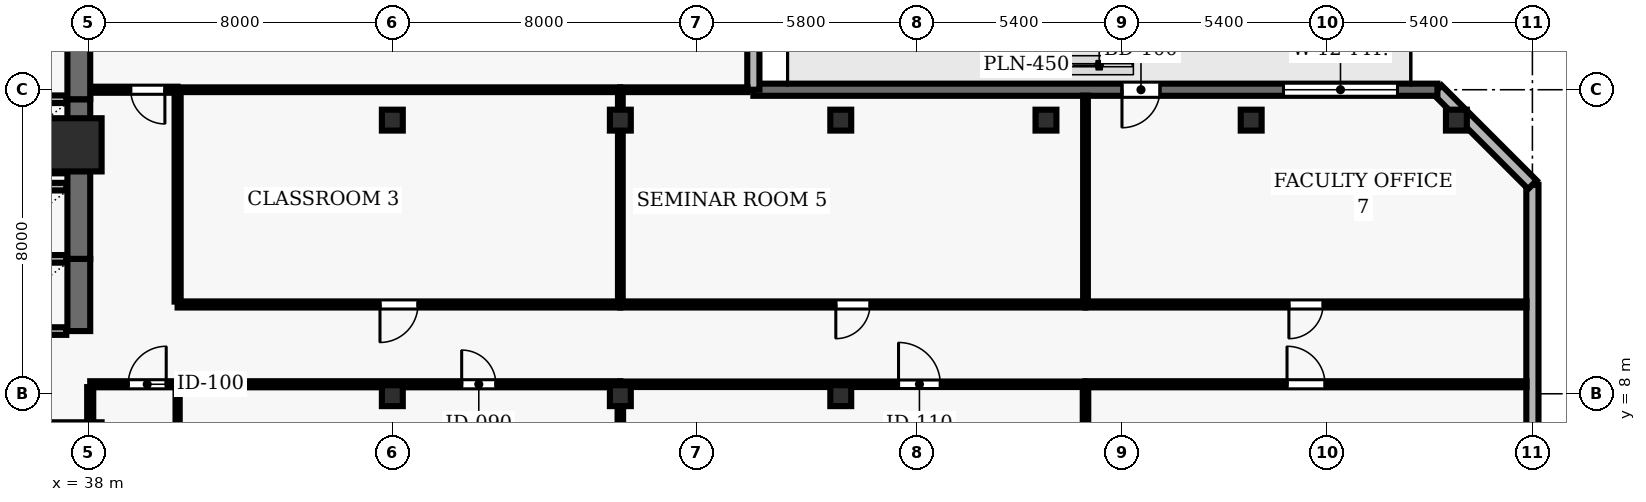
"""IFC4 building model, lengths in metres.
Left out: names, types, materials, properties, quantities, classifications, styles, units other than length and angle.
Written with IfcOpenShell. Run it as: python <this file> out.ifc"""

import sys

from ifc_helpers import new_model, si_unit, direction, frame, frame_2d, origin, origin_2d, place, context, subcontext, project, spatial, rectangle, hollow_rectangle, extrude, element, fill, save


model = new_model("IFC4")
c1 = context("Model", 3, precision=1e-05, world=origin(), true_north=direction((0.0, 1.0)))
c2 = subcontext(c1, "Body", "Model", "MODEL_VIEW")
j1 = project(units=[si_unit("LENGTHUNIT", "METRE"), si_unit("PLANEANGLEUNIT", "RADIAN")], contexts=[c1])
p1 = place(None, origin())
s1 = spatial("IfcSite", under=j1, at=p1, CompositionType="ELEMENT")
p2 = place(p1, origin())
s2 = spatial("IfcBuilding", under=s1, at=p2, CompositionType="ELEMENT")
p3 = place(p2, frame((0.0, 0.0, 34.9)))
s3 = spatial("IfcBuildingStorey", under=s2, at=p3, CompositionType="ELEMENT", Elevation=34.9)
p4 = place(p3, frame((37.65, 14.55, 0.0), z_axis=(0.0, 0.0, 1.0), x_axis=(1.0, 0.0, 0.0)))
e1 = element("IfcColumn", 1, at=p4, inside=s3, PredefinedType="COLUMN", context=c2, shape_type="SweptSolid", body=[
    extrude(rectangle(XDim=1.4, YDim=1.4, at=origin_2d()), origin(), (0.0, 0.0, 1.0), 3.9),
])
for number, where, z_axis, x_axis in (
    (2, (46.0, 7.95, 0.0), (0.0, 0.0, 1.0), (1.0, 0.0, 0.0)),
    (3, (46.0, 15.2, 0.0), (0.0, 0.0, 1.0), (1.0, 0.0, 0.0)),
    (4, (52.0, 7.95, 0.0), (0.0, 0.0, 1.0), (1.0, 0.0, 0.0)),
    (5, (52.0, 15.2, 0.0), (0.0, 0.0, 1.0), (1.0, 0.0, 0.0)),
    (6, (57.8, 7.95, 0.0), (0.0, 0.0, 1.0), (1.0, 0.0, 0.0)),
    (7, (57.8, 15.2, 0.0), (0.0, 0.0, 1.0), (1.0, 0.0, 0.0)),
    (8, (63.2, 15.2, 0.0), (0.0, 0.0, 1.0), (1.0, 0.0, 0.0)),
    (9, (68.6, 15.2, 0.0), (0.0, 0.0, 1.0), (1.0, 0.0, 0.0)),
    (10, (74.0, 15.2, 0.0), (0.0, 0.0, 1.0), (1.0, 0.0, 0.0)),
):
    element("IfcColumn", number, at=place(p3, frame(where, z_axis=z_axis, x_axis=x_axis)), inside=s3, PredefinedType="COLUMN", context=c2, shape_type="SweptSolid", body=[
        extrude(hollow_rectangle(XDim=0.55, YDim=0.55, WallThickness=0.025, at=origin_2d()), origin(), (0.0, 0.0, 1.0), 3.9),
    ])
p5 = place(p3, frame((76.0, 2.5, 0.0), z_axis=(0.0, 0.0, 1.0), x_axis=(0.0, 1.0, 0.0)))
e11 = element("IfcWall", 11, at=p5, inside=s3, PredefinedType="SOLIDWALL", context=c2, shape_type="SweptSolid", body=[
    extrude(rectangle(XDim=11.0, YDim=0.32, at=frame_2d((5.5, 0.0))), origin(), (0.0, 0.0, 1.0), 3.69),
])
p6 = place(p5, frame((1.85, 0.0, 0.9)))
e12 = element("IfcOpeningElement", 12, at=p6, cuts=e11, PredefinedType="OPENING", context=c2, shape_type="SweptSolid", body=[
    extrude(rectangle(XDim=1.8, YDim=2.2, at=frame_2d((0.9, 1.1))), frame((0.0, 0.17, 0.0), z_axis=(0.0, -1.0, 0.0), x_axis=(1.0, 0.0, 0.0)), (0.0, 0.0, 1.0), 0.34),
])
p7 = place(p3, frame((76.0, 13.5, 0.0), z_axis=(0.0, 0.0, 1.0), x_axis=(-0.707106781187, 0.707106781187, 0.0)))
e13 = element("IfcWall", 13, at=p7, inside=s3, PredefinedType="SOLIDWALL", context=c2, shape_type="SweptSolid", body=[
    extrude(rectangle(XDim=3.536, YDim=0.32, at=frame_2d((1.768, 0.0))), origin(), (0.0, 0.0, 1.0), 3.69),
])
p8 = place(p3, frame((73.5, 16.0, 0.0), z_axis=(0.0, 0.0, 1.0), x_axis=(-1.0, 0.0, 0.0)))
e14 = element("IfcWall", 14, at=p8, inside=s3, PredefinedType="SOLIDWALL", context=c2, shape_type="SweptSolid", body=[
    extrude(rectangle(XDim=18.0, YDim=0.32, at=frame_2d((9.0, 0.0))), origin(), (0.0, 0.0, 1.0), 3.69),
])
p9 = place(p8, frame((7.3, 0.0, 0.0)))
e15 = element("IfcOpeningElement", 15, at=p9, cuts=e14, PredefinedType="OPENING", context=c2, shape_type="SweptSolid", body=[
    extrude(rectangle(XDim=1.0, YDim=2.2, at=frame_2d((0.5, 1.1))), frame((0.0, 0.17, 0.0), z_axis=(0.0, -1.0, 0.0), x_axis=(1.0, 0.0, 0.0)), (0.0, 0.0, 1.0), 0.34),
])
p10 = place(p8, frame((1.05, 0.0, 0.9)))
e16 = element("IfcOpeningElement", 16, at=p10, cuts=e14, PredefinedType="OPENING", context=c2, shape_type="SweptSolid", body=[
    extrude(rectangle(XDim=3.0, YDim=2.2, at=frame_2d((1.5, 1.1))), frame((0.0, 0.17, 0.0), z_axis=(0.0, -1.0, 0.0), x_axis=(1.0, 0.0, 0.0)), (0.0, 0.0, 1.0), 0.34),
])
p11 = place(p3, frame((55.5, 16.0, 0.0), z_axis=(0.0, 0.0, 1.0), x_axis=(0.0, 1.0, 0.0)))
e17 = element("IfcWall", 17, at=p11, inside=s3, PredefinedType="SOLIDWALL", context=c2, shape_type="SweptSolid", body=[
    extrude(rectangle(XDim=11.4, YDim=0.32, at=frame_2d((5.7, 0.0))), origin(), (0.0, 0.0, 1.0), 3.69),
])
p12 = place(p11, frame((2.25, 0.0, 0.9)))
e18 = element("IfcOpeningElement", 18, at=p12, cuts=e17, PredefinedType="OPENING", context=c2, shape_type="SweptSolid", body=[
    extrude(rectangle(XDim=1.2, YDim=1.6, at=frame_2d((0.6, 0.8))), frame((0.0, 0.17, 0.0), z_axis=(0.0, -1.0, 0.0), x_axis=(1.0, 0.0, 0.0)), (0.0, 0.0, 1.0), 0.34),
])
p13 = place(p11, frame((7.95, 0.0, 0.9)))
e19 = element("IfcOpeningElement", 19, at=p13, cuts=e17, PredefinedType="OPENING", context=c2, shape_type="SweptSolid", body=[
    extrude(rectangle(XDim=1.2, YDim=1.6, at=frame_2d((0.6, 0.8))), frame((0.0, 0.17, 0.0), z_axis=(0.0, -1.0, 0.0), x_axis=(1.0, 0.0, 0.0)), (0.0, 0.0, 1.0), 0.34),
])
p14 = place(p3, frame((37.75, 9.65, 0.0), z_axis=(0.0, 0.0, 1.0), x_axis=(0.0, 1.0, 0.0)))
e20 = element("IfcWall", 20, at=p14, inside=s3, PredefinedType="SHEAR", context=c2, shape_type="SweptSolid", body=[
    extrude(rectangle(XDim=1.9, YDim=0.6, at=frame_2d((0.95, 0.0))), origin(), (0.0, 0.0, 1.0), 3.69),
])
for number, where, z_axis, x_axis in (
    (21, (35.28, 9.65, 0.0), (0.0, 0.0, 1.0), (1.0, 0.0, 0.0)),
    (22, (37.42, 11.55, 0.0), (0.0, 0.0, 1.0), (-1.0, 0.0, 0.0)),
):
    element("IfcWall", number, at=place(p3, frame(where, z_axis=z_axis, x_axis=x_axis)), inside=s3, PredefinedType="SOLIDWALL", context=c2, shape_type="SweptSolid", body=[
        extrude(rectangle(XDim=2.14, YDim=0.2, at=frame_2d((1.07, 0.0))), origin(), (0.0, 0.0, 1.0), 3.69),
    ])
p15 = place(p3, frame((37.75, 11.55, 0.0), z_axis=(0.0, 0.0, 1.0), x_axis=(0.0, 1.0, 0.0)))
e23 = element("IfcWall", 23, at=p15, inside=s3, PredefinedType="SHEAR", context=c2, shape_type="SweptSolid", body=[
    extrude(rectangle(XDim=2.35, YDim=0.6, at=frame_2d((1.175, 0.0))), origin(), (0.0, 0.0, 1.0), 3.69),
])
p16 = place(p3, frame((37.42, 13.45, 0.0), z_axis=(0.0, 0.0, 1.0), x_axis=(-1.0, 0.0, 0.0)))
e24 = element("IfcWall", 24, at=p16, inside=s3, PredefinedType="SOLIDWALL", context=c2, shape_type="SweptSolid", body=[
    extrude(rectangle(XDim=2.14, YDim=0.2, at=frame_2d((1.07, 0.0))), origin(), (0.0, 0.0, 1.0), 3.69),
])
p17 = place(p3, frame((37.75, 13.9, 0.0), z_axis=(0.0, 0.0, 1.0), x_axis=(0.0, 1.0, 0.0)))
e25 = element("IfcWall", 25, at=p17, inside=s3, PredefinedType="SHEAR", context=c2, shape_type="SweptSolid", body=[
    extrude(rectangle(XDim=1.85, YDim=0.6, at=frame_2d((0.925, 0.0))), origin(), (0.0, 0.0, 1.0), 3.69),
])
for number, where, z_axis, x_axis in (
    (26, (35.28, 13.9, 0.0), (0.0, 0.0, 1.0), (1.0, 0.0, 0.0)),
    (27, (37.42, 15.75, 0.0), (0.0, 0.0, 1.0), (-1.0, 0.0, 0.0)),
):
    element("IfcWall", number, at=place(p3, frame(where, z_axis=z_axis, x_axis=x_axis)), inside=s3, PredefinedType="SOLIDWALL", context=c2, shape_type="SweptSolid", body=[
        extrude(rectangle(XDim=2.14, YDim=0.2, at=frame_2d((1.07, 0.0))), origin(), (0.0, 0.0, 1.0), 3.69),
    ])
p18 = place(p3, frame((37.75, 15.75, 0.0), z_axis=(0.0, 0.0, 1.0), x_axis=(0.0, 1.0, 0.0)))
e28 = element("IfcWall", 28, at=p18, inside=s3, PredefinedType="SHEAR", context=c2, shape_type="SweptSolid", body=[
    extrude(rectangle(XDim=1.85, YDim=0.6, at=frame_2d((0.925, 0.0))), origin(), (0.0, 0.0, 1.0), 3.69),
])
p19 = place(p3, frame((38.05, 8.25, 0.0), z_axis=(0.0, 0.0, 1.0), x_axis=(1.0, 0.0, 0.0)))
e29 = element("IfcWall", 29, at=p19, inside=s3, PredefinedType="PARTITIONING", context=c2, shape_type="SweptSolid", body=[
    extrude(rectangle(XDim=2.3, YDim=0.16, at=frame_2d((1.15, 0.0))), origin(), (0.0, 0.0, 1.0), 3.055),
])
p20 = place(p19, frame((1.0, 0.0, 0.0)))
e30 = element("IfcOpeningElement", 30, at=p20, cuts=e29, PredefinedType="OPENING", context=c2, shape_type="SweptSolid", body=[
    extrude(rectangle(XDim=1.0, YDim=2.1, at=frame_2d((0.5, 1.05))), frame((0.0, 0.09, 0.0), z_axis=(0.0, -1.0, 0.0), x_axis=(1.0, 0.0, 0.0)), (0.0, 0.0, 1.0), 0.18),
])
p21 = place(p3, frame((40.35, 8.25, 0.0), z_axis=(0.0, 0.0, 1.0), x_axis=(1.0, 0.0, 0.0)))
e31 = element("IfcWall", 31, at=p21, inside=s3, PredefinedType="PARTITIONING", context=c2, shape_type="SweptSolid", body=[
    extrude(rectangle(XDim=11.65, YDim=0.16, at=frame_2d((5.825, 0.0))), origin(), (0.0, 0.0, 1.0), 3.055),
])
p22 = place(p21, frame((7.475, 0.0, 0.0)))
e32 = element("IfcOpeningElement", 32, at=p22, cuts=e31, PredefinedType="OPENING", context=c2, shape_type="SweptSolid", body=[
    extrude(rectangle(XDim=0.9, YDim=2.1, at=frame_2d((0.45, 1.05))), frame((0.0, 0.09, 0.0), z_axis=(0.0, -1.0, 0.0), x_axis=(1.0, 0.0, 0.0)), (0.0, 0.0, 1.0), 0.18),
])
p23 = place(p3, frame((40.35, 16.0, 0.0), z_axis=(0.0, 0.0, 1.0), x_axis=(-1.0, 0.0, 0.0)))
e33 = element("IfcWall", 33, at=p23, inside=s3, PredefinedType="PARTITIONING", context=c2, shape_type="SweptSolid", body=[
    extrude(rectangle(XDim=2.27, YDim=0.16, at=frame_2d((1.135, 0.0))), origin(), (0.0, 0.0, 1.0), 3.69),
])
p24 = place(p23, frame((0.335, 0.0, 0.0)))
e34 = element("IfcOpeningElement", 34, at=p24, cuts=e33, PredefinedType="OPENING", context=c2, shape_type="SweptSolid", body=[
    extrude(rectangle(XDim=0.9, YDim=2.1, at=frame_2d((0.45, 1.05))), frame((0.0, 0.09, 0.0), z_axis=(0.0, -1.0, 0.0), x_axis=(1.0, 0.0, 0.0)), (0.0, 0.0, 1.0), 0.18),
])
p25 = place(p3, frame((52.0, 8.25, 0.0), z_axis=(0.0, 0.0, 1.0), x_axis=(1.0, 0.0, 0.0)))
e35 = element("IfcWall", 35, at=p25, inside=s3, PredefinedType="PARTITIONING", context=c2, shape_type="SweptSolid", body=[
    extrude(rectangle(XDim=12.24, YDim=0.145, at=frame_2d((6.12, 0.0))), origin(), (0.0, 0.0, 1.0), 3.055),
])
p26 = place(p25, frame((7.32, 0.0, 0.0)))
e36 = element("IfcOpeningElement", 36, at=p26, cuts=e35, PredefinedType="OPENING", context=c2, shape_type="SweptSolid", body=[
    extrude(rectangle(XDim=1.1, YDim=2.15, at=frame_2d((0.55, 1.075))), frame((0.0, 0.083, 0.0), z_axis=(0.0, -1.0, 0.0), x_axis=(1.0, 0.0, 0.0)), (0.0, 0.0, 1.0), 0.165),
])
p27 = place(p3, frame((52.0, 10.35, 0.0), z_axis=(0.0, 0.0, 1.0), x_axis=(-1.0, 0.0, 0.0)))
e37 = element("IfcWall", 37, at=p27, inside=s3, PredefinedType="PARTITIONING", context=c2, shape_type="SweptSolid", body=[
    extrude(rectangle(XDim=11.65, YDim=0.16, at=frame_2d((5.825, 0.0))), origin(), (0.0, 0.0, 1.0), 3.277),
])
p28 = place(p27, frame((5.325, 0.0, 0.0)))
e38 = element("IfcOpeningElement", 38, at=p28, cuts=e37, PredefinedType="OPENING", context=c2, shape_type="SweptSolid", body=[
    extrude(rectangle(XDim=1.0, YDim=2.1, at=frame_2d((0.5, 1.05))), frame((0.0, 0.09, 0.0), z_axis=(0.0, -1.0, 0.0), x_axis=(1.0, 0.0, 0.0)), (0.0, 0.0, 1.0), 0.18),
])
p29 = place(p3, frame((52.0, 16.0, 0.0), z_axis=(0.0, 0.0, 1.0), x_axis=(1.0, 0.0, 0.0)))
e39 = element("IfcWall", 39, at=p29, inside=s3, PredefinedType="PARTITIONING", context=c2, shape_type="SweptSolid", body=[
    extrude(rectangle(XDim=3.345, YDim=0.125, at=frame_2d((1.672, 0.0))), origin(), (0.0, 0.0, 1.0), 3.69),
])
p30 = place(p3, frame((52.0, 16.0, 0.0), z_axis=(0.0, 0.0, 1.0), x_axis=(-1.0, 0.0, 0.0)))
e40 = element("IfcWall", 40, at=p30, inside=s3, PredefinedType="PARTITIONING", context=c2, shape_type="SweptSolid", body=[
    extrude(rectangle(XDim=11.65, YDim=0.125, at=frame_2d((5.825, 0.0))), origin(), (0.0, 0.0, 1.0), 3.69),
])
p31 = place(p3, frame((64.24, 8.25, 0.0), z_axis=(0.0, 0.0, 1.0), x_axis=(1.0, 0.0, 0.0)))
e41 = element("IfcWall", 41, at=p31, inside=s3, PredefinedType="PARTITIONING", context=c2, shape_type="SweptSolid", body=[
    extrude(rectangle(XDim=11.605, YDim=0.16, at=frame_2d((5.802, 0.0))), origin(), (0.0, 0.0, 1.0), 3.69),
])
p32 = place(p31, frame((5.303, 0.0, 0.0)))
e42 = element("IfcOpeningElement", 42, at=p32, cuts=e41, PredefinedType="OPENING", context=c2, shape_type="SweptSolid", body=[
    extrude(rectangle(XDim=1.0, YDim=2.1, at=frame_2d((0.5, 1.05))), frame((0.0, 0.09, 0.0), z_axis=(0.0, -1.0, 0.0), x_axis=(1.0, 0.0, 0.0)), (0.0, 0.0, 1.0), 0.18),
])
p33 = place(p3, frame((64.24, 10.35, 0.0), z_axis=(0.0, 0.0, 1.0), x_axis=(-1.0, 0.0, 0.0)))
e43 = element("IfcWall", 43, at=p33, inside=s3, PredefinedType="PARTITIONING", context=c2, shape_type="SweptSolid", body=[
    extrude(rectangle(XDim=12.24, YDim=0.16, at=frame_2d((6.12, 0.0))), origin(), (0.0, 0.0, 1.0), 3.277),
])
p34 = place(p33, frame((5.67, 0.0, 0.0)))
e44 = element("IfcOpeningElement", 44, at=p34, cuts=e43, PredefinedType="OPENING", context=c2, shape_type="SweptSolid", body=[
    extrude(rectangle(XDim=0.9, YDim=2.1, at=frame_2d((0.45, 1.05))), frame((0.0, 0.09, 0.0), z_axis=(0.0, -1.0, 0.0), x_axis=(1.0, 0.0, 0.0)), (0.0, 0.0, 1.0), 0.18),
])
p35 = place(p3, frame((75.845, 10.35, 0.0), z_axis=(0.0, 0.0, 1.0), x_axis=(-1.0, 0.0, 0.0)))
e45 = element("IfcWall", 45, at=p35, inside=s3, PredefinedType="PARTITIONING", context=c2, shape_type="SweptSolid", body=[
    extrude(rectangle(XDim=11.605, YDim=0.16, at=frame_2d((5.802, 0.0))), origin(), (0.0, 0.0, 1.0), 3.277),
])
p36 = place(p35, frame((5.353, 0.0, 0.0)))
e46 = element("IfcOpeningElement", 46, at=p36, cuts=e45, PredefinedType="OPENING", context=c2, shape_type="SweptSolid", body=[
    extrude(rectangle(XDim=0.9, YDim=2.1, at=frame_2d((0.45, 1.05))), frame((0.0, 0.09, 0.0), z_axis=(0.0, -1.0, 0.0), x_axis=(1.0, 0.0, 0.0)), (0.0, 0.0, 1.0), 0.18),
])
p37 = place(p3, frame((38.05, 7.05, 0.0), z_axis=(0.0, 0.0, 1.0), x_axis=(0.0, 1.0, 0.0)))
e47 = element("IfcWall", 47, at=p37, inside=s3, PredefinedType="PARTITIONING", context=c2, shape_type="SweptSolid", body=[
    extrude(rectangle(XDim=1.125, YDim=0.16, at=frame_2d((0.562, 0.0))), origin(), (0.0, 0.0, 1.0), 3.055),
])
p38 = place(p3, frame((40.35, 0.155, 0.0), z_axis=(0.0, 0.0, 1.0), x_axis=(0.0, 1.0, 0.0)))
e48 = element("IfcWall", 48, at=p38, inside=s3, PredefinedType="MOVABLE", context=c2, shape_type="SweptSolid", body=[
    extrude(rectangle(XDim=8.02, YDim=0.11, at=frame_2d((4.01, 0.0))), origin(), (0.0, 0.0, 1.0), 3.69),
])
p39 = place(p3, frame((40.35, 10.425, 0.0), z_axis=(0.0, 0.0, 1.0), x_axis=(0.0, 1.0, 0.0)))
e49 = element("IfcWall", 49, at=p39, inside=s3, PredefinedType="PARTITIONING", context=c2, shape_type="SweptSolid", body=[
    extrude(rectangle(XDim=5.5, YDim=0.16, at=frame_2d((2.75, 0.0))), origin(), (0.0, 0.0, 1.0), 3.277),
])
p40 = place(p3, frame((52.0, 0.155, 0.0), z_axis=(0.0, 0.0, 1.0), x_axis=(0.0, 1.0, 0.0)))
e50 = element("IfcWall", 50, at=p40, inside=s3, PredefinedType="PARTITIONING", context=c2, shape_type="SweptSolid", body=[
    extrude(rectangle(XDim=8.02, YDim=0.145, at=frame_2d((4.01, 0.0))), origin(), (0.0, 0.0, 1.0), 3.055),
])
p41 = place(p3, frame((52.0, 10.425, 0.0), z_axis=(0.0, 0.0, 1.0), x_axis=(0.0, 1.0, 0.0)))
e51 = element("IfcWall", 51, at=p41, inside=s3, PredefinedType="PARTITIONING", context=c2, shape_type="SweptSolid", body=[
    extrude(rectangle(XDim=5.518, YDim=0.125, at=frame_2d((2.759, 0.0))), origin(), (0.0, 0.0, 1.0), 3.055),
])
p42 = place(p3, frame((64.24, 0.155, 0.0), z_axis=(0.0, 0.0, 1.0), x_axis=(0.0, 1.0, 0.0)))
e52 = element("IfcWall", 52, at=p42, inside=s3, PredefinedType="PARTITIONING", context=c2, shape_type="SweptSolid", body=[
    extrude(rectangle(XDim=8.02, YDim=0.145, at=frame_2d((4.01, 0.0))), origin(), (0.0, 0.0, 1.0), 3.69),
])
p43 = place(p3, frame((64.24, 10.425, 0.0), z_axis=(0.0, 0.0, 1.0), x_axis=(0.0, 1.0, 0.0)))
e53 = element("IfcWall", 53, at=p43, inside=s3, PredefinedType="PARTITIONING", context=c2, shape_type="SweptSolid", body=[
    extrude(rectangle(XDim=5.42, YDim=0.125, at=frame_2d((2.71, 0.0))), origin(), (0.0, 0.0, 1.0), 3.69),
])
p44 = place(p9, origin())
e54 = element("IfcDoor", 54, at=p44, inside=s3, OperationType="SINGLE_SWING_RIGHT", PredefinedType="DOOR", context=c2, shape_type="SweptSolid", body=[
    extrude(rectangle(XDim=1.0, YDim=2.2, at=frame_2d((0.5, 1.1))), frame((0.0, 0.025, 0.0), z_axis=(0.0, -1.0, 0.0), x_axis=(1.0, 0.0, 0.0)), (0.0, 0.0, 1.0), 0.05),
])
fill(e15, e54)
p45 = place(p10, origin())
e55 = element("IfcWindow", 55, at=p45, inside=s3, PartitioningType="SINGLE_PANEL", PredefinedType="WINDOW", context=c2, shape_type="SweptSolid", body=[
    extrude(rectangle(XDim=3.0, YDim=2.2, at=frame_2d((1.5, 1.1))), frame((0.0, 0.03, 0.0), z_axis=(0.0, -1.0, 0.0), x_axis=(1.0, 0.0, 0.0)), (0.0, 0.0, 1.0), 0.06),
])
fill(e16, e55)
p46 = place(p20, origin())
e56 = element("IfcDoor", 56, at=p46, inside=s3, OperationType="SINGLE_SWING_RIGHT", PredefinedType="DOOR", context=c2, shape_type="SweptSolid", body=[
    extrude(rectangle(XDim=1.0, YDim=2.1, at=frame_2d((0.5, 1.05))), frame((0.0, 0.025, 0.0), z_axis=(0.0, -1.0, 0.0), x_axis=(1.0, 0.0, 0.0)), (0.0, 0.0, 1.0), 0.05),
])
fill(e30, e56)
p47 = place(p22, origin())
e57 = element("IfcDoor", 57, at=p47, inside=s3, OperationType="SINGLE_SWING_LEFT", PredefinedType="DOOR", context=c2, shape_type="SweptSolid", body=[
    extrude(rectangle(XDim=0.9, YDim=2.1, at=frame_2d((0.45, 1.05))), frame((0.0, 0.025, 0.0), z_axis=(0.0, -1.0, 0.0), x_axis=(1.0, 0.0, 0.0)), (0.0, 0.0, 1.0), 0.05),
])
fill(e32, e57)
p48 = place(p28, origin())
e58 = element("IfcDoor", 58, at=p48, inside=s3, OperationType="SINGLE_SWING_RIGHT", PredefinedType="DOOR", context=c2, shape_type="SweptSolid", body=[
    extrude(rectangle(XDim=1.0, YDim=2.1, at=frame_2d((0.5, 1.05))), frame((0.0, 0.025, 0.0), z_axis=(0.0, -1.0, 0.0), x_axis=(1.0, 0.0, 0.0)), (0.0, 0.0, 1.0), 0.05),
])
fill(e38, e58)
p49 = place(p26, origin())
e59 = element("IfcDoor", 59, at=p49, inside=s3, OperationType="SINGLE_SWING_LEFT", PredefinedType="DOOR", context=c2, shape_type="SweptSolid", body=[
    extrude(rectangle(XDim=1.1, YDim=2.15, at=frame_2d((0.55, 1.075))), frame((0.0, 0.025, 0.0), z_axis=(0.0, -1.0, 0.0), x_axis=(1.0, 0.0, 0.0)), (0.0, 0.0, 1.0), 0.05),
])
fill(e36, e59)
p50 = place(p34, origin())
e60 = element("IfcDoor", 60, at=p50, inside=s3, OperationType="SINGLE_SWING_RIGHT", PredefinedType="DOOR", context=c2, shape_type="SweptSolid", body=[
    extrude(rectangle(XDim=0.9, YDim=2.1, at=frame_2d((0.45, 1.05))), frame((0.0, 0.025, 0.0), z_axis=(0.0, -1.0, 0.0), x_axis=(1.0, 0.0, 0.0)), (0.0, 0.0, 1.0), 0.05),
])
fill(e44, e60)
p51 = place(p32, origin())
e61 = element("IfcDoor", 61, at=p51, inside=s3, OperationType="SINGLE_SWING_LEFT", PredefinedType="DOOR", context=c2, shape_type="SweptSolid", body=[
    extrude(rectangle(XDim=1.0, YDim=2.1, at=frame_2d((0.5, 1.05))), frame((0.0, 0.025, 0.0), z_axis=(0.0, -1.0, 0.0), x_axis=(1.0, 0.0, 0.0)), (0.0, 0.0, 1.0), 0.05),
])
fill(e42, e61)
p52 = place(p36, origin())
e62 = element("IfcDoor", 62, at=p52, inside=s3, OperationType="SINGLE_SWING_RIGHT", PredefinedType="DOOR", context=c2, shape_type="SweptSolid", body=[
    extrude(rectangle(XDim=0.9, YDim=2.1, at=frame_2d((0.45, 1.05))), frame((0.0, 0.025, 0.0), z_axis=(0.0, -1.0, 0.0), x_axis=(1.0, 0.0, 0.0)), (0.0, 0.0, 1.0), 0.05),
])
fill(e46, e62)
p53 = place(p24, origin())
e63 = element("IfcDoor", 63, at=p53, inside=s3, OperationType="SINGLE_SWING_LEFT", PredefinedType="DOOR", context=c2, shape_type="SweptSolid", body=[
    extrude(rectangle(XDim=0.9, YDim=2.1, at=frame_2d((0.45, 1.05))), frame((0.0, 0.025, 0.0), z_axis=(0.0, -1.0, 0.0), x_axis=(1.0, 0.0, 0.0)), (0.0, 0.0, 1.0), 0.05),
])
fill(e34, e63)
save(model, sys.argv[1])
